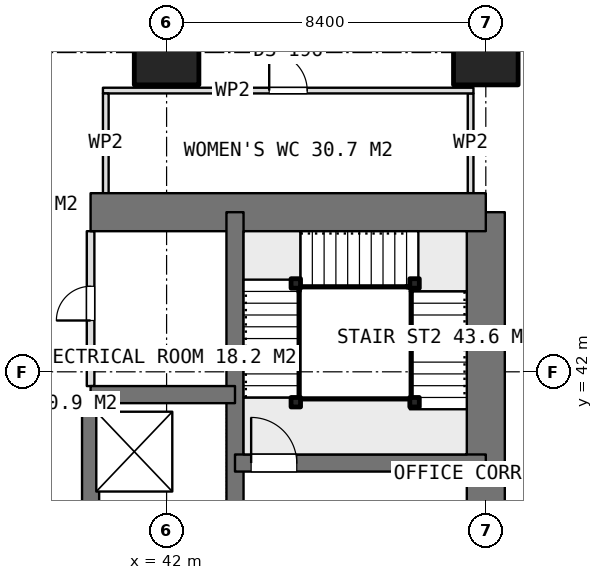
"""IFC4 building model, lengths in metres.
Left out: names, types, materials, properties, quantities, classifications, styles, units other than length and angle.
Written with IfcOpenShell. Run it as: python <this file> out.ifc"""

import sys

from ifc_helpers import new_model, si_unit, direction, frame, frame_2d, origin, origin_2d, place, context, subcontext, project, spatial, rectangle, extrude, element, fill, save


model = new_model("IFC4")
c1 = context("Model", 3, precision=1e-05, world=origin(), true_north=direction((0.0, 1.0)))
c2 = subcontext(c1, "Body", "Model", "MODEL_VIEW")
j1 = project(units=[si_unit("LENGTHUNIT", "METRE"), si_unit("PLANEANGLEUNIT", "RADIAN")], contexts=[c1])
p1 = place(None, origin())
s1 = spatial("IfcSite", under=j1, at=p1, CompositionType="ELEMENT")
p2 = place(p1, origin())
s2 = spatial("IfcBuilding", under=s1, at=p2, CompositionType="ELEMENT")
p3 = place(p2, frame((0.0, 0.0, 183.95)))
s3 = spatial("IfcBuildingStorey", under=s2, at=p3, CompositionType="ELEMENT", Elevation=183.95)
p4 = place(p3, frame((40.0, 46.2, 0.0), z_axis=(0.0, 0.0, 1.0), x_axis=(1.0, 0.0, 0.0)))
e1 = element("IfcWall", 1, at=p4, inside=s3, PredefinedType="SHEAR", context=c2, shape_type="SweptSolid", body=[
    extrude(rectangle(XDim=10.4, YDim=1.0, at=frame_2d((5.2, 0.0))), origin(), (0.0, 0.0, 1.0), 3.75),
])
p5 = place(p3, frame((50.4, 21.0, 0.0), z_axis=(0.0, 0.0, 1.0), x_axis=(0.0, 1.0, 0.0)))
e2 = element("IfcWall", 2, at=p5, inside=s3, PredefinedType="SHEAR", context=c2, shape_type="SweptSolid", body=[
    extrude(rectangle(XDim=25.2, YDim=1.0, at=frame_2d((12.6, 0.0))), origin(), (0.0, 0.0, 1.0), 3.75),
])
p6 = place(p5, frame((16.2, 0.0, 0.0)))
e3 = element("IfcOpeningElement", 3, at=p6, cuts=e2, PredefinedType="OPENING", context=c2, shape_type="SweptSolid", body=[
    extrude(rectangle(XDim=1.2, YDim=2.1, at=frame_2d((0.6, 1.05))), frame((0.0, 0.51, 0.0), z_axis=(0.0, -1.0, 0.0), x_axis=(1.0, 0.0, 0.0)), (0.0, 0.0, 1.0), 1.02),
])
p7 = place(p5, frame((10.05, 0.0, 0.0)))
e4 = element("IfcOpeningElement", 4, at=p7, cuts=e2, PredefinedType="OPENING", context=c2, shape_type="SweptSolid", body=[
    extrude(rectangle(XDim=0.9, YDim=2.1, at=frame_2d((0.45, 1.05))), frame((0.0, 0.51, 0.0), z_axis=(0.0, -1.0, 0.0), x_axis=(1.0, 0.0, 0.0)), (0.0, 0.0, 1.0), 1.02),
])
p8 = place(p5, frame((7.45, 0.0, 0.0)))
e5 = element("IfcOpeningElement", 5, at=p8, cuts=e2, PredefinedType="OPENING", context=c2, shape_type="SweptSolid", body=[
    extrude(rectangle(XDim=0.9, YDim=2.1, at=frame_2d((0.45, 1.05))), frame((0.0, 0.51, 0.0), z_axis=(0.0, -1.0, 0.0), x_axis=(1.0, 0.0, 0.0)), (0.0, 0.0, 1.0), 1.02),
])
p9 = place(p5, frame((0.7, 0.0, 0.0)))
e6 = element("IfcOpeningElement", 6, at=p9, cuts=e2, PredefinedType="OPENING", context=c2, shape_type="SweptSolid", body=[
    extrude(rectangle(XDim=1.2, YDim=2.1, at=frame_2d((0.6, 1.05))), frame((0.0, 0.51, 0.0), z_axis=(0.0, -1.0, 0.0), x_axis=(1.0, 0.0, 0.0)), (0.0, 0.0, 1.0), 1.02),
])
p10 = place(p3, frame((43.8, 21.0, 0.0), z_axis=(0.0, 0.0, 1.0), x_axis=(0.0, 1.0, 0.0)))
e7 = element("IfcWall", 7, at=p10, inside=s3, PredefinedType="SHEAR", context=c2, shape_type="SweptSolid", body=[
    extrude(rectangle(XDim=25.2, YDim=0.45, at=frame_2d((12.6, 0.0))), origin(), (0.0, 0.0, 1.0), 3.75),
])
p11 = place(p3, frame((40.0, 23.4, 0.0), z_axis=(0.0, 0.0, 1.0), x_axis=(0.0, 1.0, 0.0)))
e8 = element("IfcWall", 8, at=p11, inside=s3, PredefinedType="SHEAR", context=c2, shape_type="SweptSolid", body=[
    extrude(rectangle(XDim=18.0, YDim=0.45, at=frame_2d((9.0, 0.0))), origin(), (0.0, 0.0, 1.0), 3.75),
])
p12 = place(p11, frame((1.8, 0.0, 0.0)))
e9 = element("IfcOpeningElement", 9, at=p12, cuts=e8, PredefinedType="OPENING", context=c2, shape_type="SweptSolid", body=[
    extrude(rectangle(XDim=1.0, YDim=2.1, at=frame_2d((0.5, 1.05))), frame((0.0, 0.235, 0.0), z_axis=(0.0, -1.0, 0.0), x_axis=(1.0, 0.0, 0.0)), (0.0, 0.0, 1.0), 0.47),
])
p13 = place(p11, frame((5.75, 0.0, 0.0)))
e10 = element("IfcOpeningElement", 10, at=p13, cuts=e8, PredefinedType="OPENING", context=c2, shape_type="SweptSolid", body=[
    extrude(rectangle(XDim=0.9, YDim=2.1, at=frame_2d((0.45, 1.05))), frame((0.0, 0.235, 0.0), z_axis=(0.0, -1.0, 0.0), x_axis=(1.0, 0.0, 0.0)), (0.0, 0.0, 1.0), 0.47),
])
p14 = place(p11, frame((9.4, 0.0, 0.0)))
e11 = element("IfcOpeningElement", 11, at=p14, cuts=e8, PredefinedType="OPENING", context=c2, shape_type="SweptSolid", body=[
    extrude(rectangle(XDim=1.0, YDim=2.1, at=frame_2d((0.5, 1.05))), frame((0.0, 0.235, 0.0), z_axis=(0.0, -1.0, 0.0), x_axis=(1.0, 0.0, 0.0)), (0.0, 0.0, 1.0), 0.47),
])
p15 = place(p3, frame((40.0, 41.4, 0.0), z_axis=(0.0, 0.0, 1.0), x_axis=(1.0, 0.0, 0.0)))
e12 = element("IfcWall", 12, at=p15, inside=s3, PredefinedType="SHEAR", context=c2, shape_type="SweptSolid", body=[
    extrude(rectangle(XDim=3.8, YDim=0.45, at=frame_2d((1.9, 0.0))), origin(), (0.0, 0.0, 1.0), 3.75),
])
p16 = place(p3, frame((43.8, 39.6, 0.0), z_axis=(0.0, 0.0, 1.0), x_axis=(1.0, 0.0, 0.0)))
e13 = element("IfcWall", 13, at=p16, inside=s3, PredefinedType="SHEAR", context=c2, shape_type="SweptSolid", body=[
    extrude(rectangle(XDim=6.6, YDim=0.45, at=frame_2d((3.3, 0.0))), origin(), (0.0, 0.0, 1.0), 3.75),
])
p17 = place(p16, frame((0.425, 0.0, 0.0)))
e14 = element("IfcOpeningElement", 14, at=p17, cuts=e13, PredefinedType="OPENING", context=c2, shape_type="SweptSolid", body=[
    extrude(rectangle(XDim=1.2, YDim=2.1, at=frame_2d((0.6, 1.05))), frame((0.0, 0.235, 0.0), z_axis=(0.0, -1.0, 0.0), x_axis=(1.0, 0.0, 0.0)), (0.0, 0.0, 1.0), 0.47),
])
for number, where, z_axis, x_axis in (
    (15, (42.0, 50.4, 0.0), (0.0, 0.0, 1.0), (1.0, 0.0, 0.0)),
    (16, (50.4, 50.4, 0.0), (0.0, 0.0, 1.0), (1.0, 0.0, 0.0)),
):
    element("IfcColumn", number, at=place(p3, frame(where, z_axis=z_axis, x_axis=x_axis)), inside=s3, PredefinedType="COLUMN", context=c2, shape_type="SweptSolid", body=[
        extrude(rectangle(XDim=1.7, YDim=1.7, at=origin_2d()), origin(), (0.0, 0.0, 1.0), 3.75),
    ])
p18 = place(p3, frame((40.0, 41.625, 0.0), z_axis=(0.0, 0.0, 1.0), x_axis=(0.0, 1.0, 0.0)))
e17 = element("IfcWall", 17, at=p18, inside=s3, PredefinedType="PARTITIONING", context=c2, shape_type="SweptSolid", body=[
    extrude(rectangle(XDim=4.075, YDim=0.2, at=frame_2d((2.038, 0.0))), origin(), (0.0, 0.0, 1.0), 3.5),
])
p19 = place(p18, frame((1.725, 0.0, 0.0)))
e18 = element("IfcOpeningElement", 18, at=p19, cuts=e17, PredefinedType="OPENING", context=c2, shape_type="SweptSolid", body=[
    extrude(rectangle(XDim=0.9, YDim=2.1, at=frame_2d((0.45, 1.05))), frame((0.0, 0.11, 0.0), z_axis=(0.0, -1.0, 0.0), x_axis=(1.0, 0.0, 0.0)), (0.0, 0.0, 1.0), 0.22),
])
p20 = place(p3, frame((40.325, 49.4, 0.0), z_axis=(0.0, 0.0, 1.0), x_axis=(1.0, 0.0, 0.0)))
e19 = element("IfcWall", 19, at=p20, inside=s3, PredefinedType="PARTITIONING", context=c2, shape_type="SweptSolid", body=[
    extrude(rectangle(XDim=9.75, YDim=0.15, at=frame_2d((4.875, 0.0))), origin(), (0.0, 0.0, 1.0), 3.5),
])
p21 = place(p20, frame((4.375, 0.0, 0.0)))
e20 = element("IfcOpeningElement", 20, at=p21, cuts=e19, PredefinedType="OPENING", context=c2, shape_type="SweptSolid", body=[
    extrude(rectangle(XDim=1.0, YDim=2.1, at=frame_2d((0.5, 1.05))), frame((0.0, 0.085, 0.0), z_axis=(0.0, -1.0, 0.0), x_axis=(1.0, 0.0, 0.0)), (0.0, 0.0, 1.0), 0.17),
])
for number, where, z_axis, x_axis in (
    (21, (40.4, 46.7, 0.0), (0.0, 0.0, 1.0), (0.0, 1.0, 0.0)),
    (22, (50.0, 46.7, 0.0), (0.0, 0.0, 1.0), (0.0, 1.0, 0.0)),
):
    element("IfcWall", number, at=place(p3, frame(where, z_axis=z_axis, x_axis=x_axis)), inside=s3, PredefinedType="PARTITIONING", context=c2, shape_type="SweptSolid", body=[
        extrude(rectangle(XDim=2.625, YDim=0.15, at=frame_2d((1.312, 0.0))), origin(), (0.0, 0.0, 1.0), 3.5),
    ])
for number, where, z_axis, x_axis in (
    (23, (45.4, 41.2, 0.0), (0.0, 0.0, 1.0), (1.0, 0.0, 0.0)),
    (24, (45.4, 44.325, 0.0), (0.0, 0.0, 1.0), (1.0, 0.0, 0.0)),
    (25, (48.525, 44.325, 0.0), (0.0, 0.0, 1.0), (1.0, 0.0, 0.0)),
    (26, (48.525, 41.2, 0.0), (0.0, 0.0, 1.0), (1.0, 0.0, 0.0)),
):
    element("IfcColumn", number, at=place(p3, frame(where, z_axis=z_axis, x_axis=x_axis)), inside=s3, PredefinedType="COLUMN", context=c2, shape_type="SweptSolid", body=[
        extrude(rectangle(XDim=0.25, YDim=0.25, at=origin_2d()), origin(), (0.0, 0.0, 1.0), 3.75),
    ])
p22 = place(p19, origin())
e27 = element("IfcDoor", 27, at=p22, inside=s3, OperationType="SINGLE_SWING_LEFT", PredefinedType="DOOR", context=c2, shape_type="SweptSolid", body=[
    extrude(rectangle(XDim=0.9, YDim=2.1, at=frame_2d((0.45, 1.05))), frame((0.0, 0.025, 0.0), z_axis=(0.0, -1.0, 0.0), x_axis=(1.0, 0.0, 0.0)), (0.0, 0.0, 1.0), 0.05),
])
fill(e18, e27)
p23 = place(p21, origin())
e28 = element("IfcDoor", 28, at=p23, inside=s3, OperationType="SINGLE_SWING_LEFT", PredefinedType="DOOR", context=c2, shape_type="SweptSolid", body=[
    extrude(rectangle(XDim=1.0, YDim=2.1, at=frame_2d((0.5, 1.05))), frame((0.0, 0.025, 0.0), z_axis=(0.0, -1.0, 0.0), x_axis=(1.0, 0.0, 0.0)), (0.0, 0.0, 1.0), 0.05),
])
fill(e20, e28)
p24 = place(p17, origin())
e29 = element("IfcDoor", 29, at=p24, inside=s3, OperationType="SINGLE_SWING_RIGHT", PredefinedType="DOOR", context=c2, shape_type="SweptSolid", body=[
    extrude(rectangle(XDim=1.2, YDim=2.1, at=frame_2d((0.6, 1.05))), frame((0.0, 0.025, 0.0), z_axis=(0.0, -1.0, 0.0), x_axis=(1.0, 0.0, 0.0)), (0.0, 0.0, 1.0), 0.05),
])
fill(e14, e29)
save(model, sys.argv[1])
